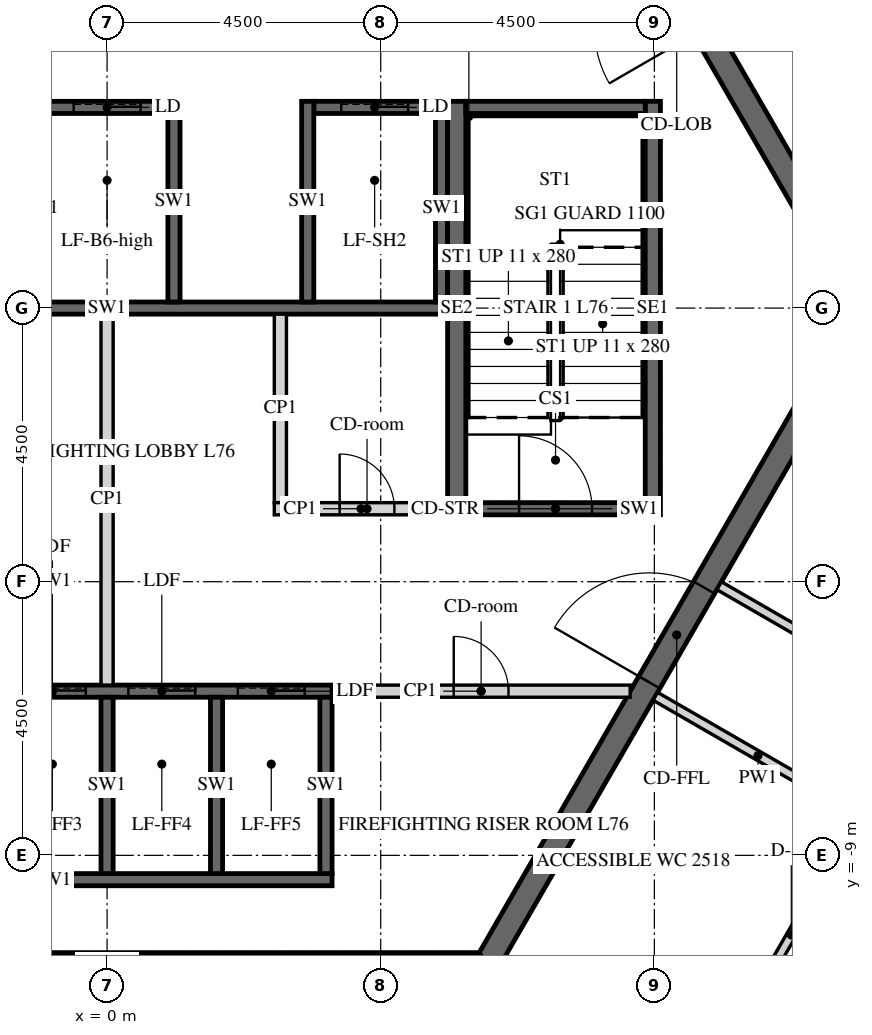
"""IFC4 building model, lengths in metres.
Left out: names, types, materials, properties, quantities, classifications, styles, units other than length and angle.
Written with IfcOpenShell. Run it as: python <this file> out.ifc"""

import sys

from ifc_helpers import new_model, si_unit, direction, frame, frame_2d, origin, place, context, subcontext, project, spatial, polyline, rectangle, outline, extrude, element, fill, save


model = new_model("IFC4")
c1 = context("Model", 3, precision=1e-05, world=origin(), true_north=direction((0.0, 1.0)))
c2 = subcontext(c1, "Body", "Model", "MODEL_VIEW")
j1 = project(units=[si_unit("LENGTHUNIT", "METRE"), si_unit("PLANEANGLEUNIT", "RADIAN")], contexts=[c1])
p1 = place(None, origin())
s1 = spatial("IfcSite", under=j1, at=p1, CompositionType="ELEMENT")
p2 = place(p1, origin())
s2 = spatial("IfcBuilding", under=s1, at=p2, CompositionType="ELEMENT")
p3 = place(p2, frame((0.0, 0.0, 314.7)))
s3 = spatial("IfcBuildingStorey", under=s2, at=p3, CompositionType="ELEMENT", Elevation=314.7)
p4 = place(p3, frame((-6.235, -10.8, -0.15), z_axis=(0.0, 0.0, 1.0), x_axis=(1.0, 0.0, 0.0)))
e1 = element("IfcWall", 1, at=p4, inside=s3, PredefinedType="SHEAR", context=c2, shape_type="SweptSolid", body=[
    extrude(outline(polyline([(-0.115, -0.2), (12.586, -0.2), (12.355, 0.2), (0.115, 0.2), (-0.115, -0.2)])), origin(), (0.0, 0.0, 1.0), 3.9),
])
p5 = place(p3, frame((6.235, -10.8, -0.15), z_axis=(0.0, 0.0, 1.0), x_axis=(0.499996419489, 0.866027470984, 0.0)))
e2 = element("IfcWall", 2, at=p5, inside=s3, PredefinedType="SHEAR", context=c2, shape_type="SweptSolid", body=[
    extrude(outline(polyline([(-0.115, -0.2), (12.586, -0.2), (12.355, 0.2), (0.115, 0.2), (-0.115, -0.2)])), origin(), (0.0, 0.0, 1.0), 3.9),
])
p6 = place(p5, frame((5.364, 0.0, 0.15)))
e3 = element("IfcOpeningElement", 3, at=p6, cuts=e2, PredefinedType="OPENING", context=c2, shape_type="SweptSolid", body=[
    extrude(rectangle(XDim=1.8, YDim=2.4, at=frame_2d((0.9, 1.2))), frame((0.0, 0.21, 0.0), z_axis=(0.0, -1.0, 0.0), x_axis=(1.0, 0.0, 0.0)), (0.0, 0.0, 1.0), 0.42),
])
p7 = place(p3, frame((12.471, 0.0, -0.15), z_axis=(0.0, 0.0, 1.0), x_axis=(-0.499996419489, 0.866027470984, 0.0)))
e4 = element("IfcWall", 4, at=p7, inside=s3, PredefinedType="SHEAR", context=c2, shape_type="SweptSolid", body=[
    extrude(outline(polyline([(-0.115, -0.2), (12.586, -0.2), (12.355, 0.2), (0.115, 0.2), (-0.115, -0.2)])), origin(), (0.0, 0.0, 1.0), 3.9),
])
p8 = place(p7, frame((5.306, 0.0, 0.15)))
e5 = element("IfcOpeningElement", 5, at=p8, cuts=e4, PredefinedType="OPENING", context=c2, shape_type="SweptSolid", body=[
    extrude(rectangle(XDim=1.8, YDim=2.4, at=frame_2d((0.9, 1.2))), frame((0.0, 0.21, 0.0), z_axis=(0.0, -1.0, 0.0), x_axis=(1.0, 0.0, 0.0)), (0.0, 0.0, 1.0), 0.42),
])
p9 = place(p3, frame((-5.6, 3.3, -0.25), z_axis=(0.0, 0.0, 1.0), x_axis=(1.0, 0.0, 0.0)))
e6 = element("IfcWall", 6, at=p9, inside=s3, PredefinedType="SHEAR", context=c2, shape_type="SweptSolid", body=[
    extrude(rectangle(XDim=6.6, YDim=0.2, at=frame_2d((3.3, 0.0))), origin(), (0.0, 0.0, 1.0), 3.9),
])
p10 = place(p9, frame((0.65, 0.0, 0.25)))
e7 = element("IfcOpeningElement", 7, at=p10, cuts=e6, PredefinedType="OPENING", context=c2, shape_type="SweptSolid", body=[
    extrude(rectangle(XDim=1.1, YDim=2.1, at=frame_2d((0.55, 1.05))), frame((0.0, 0.11, 0.0), z_axis=(0.0, -1.0, 0.0), x_axis=(1.0, 0.0, 0.0)), (0.0, 0.0, 1.0), 0.22),
])
p11 = place(p9, frame((2.85, 0.0, 0.25)))
e8 = element("IfcOpeningElement", 8, at=p11, cuts=e6, PredefinedType="OPENING", context=c2, shape_type="SweptSolid", body=[
    extrude(rectangle(XDim=1.1, YDim=2.1, at=frame_2d((0.55, 1.05))), frame((0.0, 0.11, 0.0), z_axis=(0.0, -1.0, 0.0), x_axis=(1.0, 0.0, 0.0)), (0.0, 0.0, 1.0), 0.22),
])
p12 = place(p9, frame((5.05, 0.0, 0.25)))
e9 = element("IfcOpeningElement", 9, at=p12, cuts=e6, PredefinedType="OPENING", context=c2, shape_type="SweptSolid", body=[
    extrude(rectangle(XDim=1.1, YDim=2.1, at=frame_2d((0.55, 1.05))), frame((0.0, 0.11, 0.0), z_axis=(0.0, -1.0, 0.0), x_axis=(1.0, 0.0, 0.0)), (0.0, 0.0, 1.0), 0.22),
])
p13 = place(p3, frame((3.4, 3.3, -0.25), z_axis=(0.0, 0.0, 1.0), x_axis=(1.0, 0.0, 0.0)))
e10 = element("IfcWall", 10, at=p13, inside=s3, PredefinedType="SHEAR", context=c2, shape_type="SweptSolid", body=[
    extrude(rectangle(XDim=2.2, YDim=0.2, at=frame_2d((1.1, 0.0))), origin(), (0.0, 0.0, 1.0), 3.9),
])
p14 = place(p13, frame((0.45, 0.0, 0.25)))
e11 = element("IfcOpeningElement", 11, at=p14, cuts=e10, PredefinedType="OPENING", context=c2, shape_type="SweptSolid", body=[
    extrude(rectangle(XDim=1.1, YDim=2.1, at=frame_2d((0.55, 1.05))), frame((0.0, 0.11, 0.0), z_axis=(0.0, -1.0, 0.0), x_axis=(1.0, 0.0, 0.0)), (0.0, 0.0, 1.0), 0.22),
])
p15 = place(p3, frame((-5.6, 0.0, -0.25), z_axis=(0.0, 0.0, 1.0), x_axis=(1.0, 0.0, 0.0)))
e12 = element("IfcWall", 12, at=p15, inside=s3, PredefinedType="SHEAR", context=c2, shape_type="SweptSolid", body=[
    extrude(rectangle(XDim=11.2, YDim=0.2, at=frame_2d((5.6, 0.0))), origin(), (0.0, 0.0, 1.0), 3.9),
])
for number, where, z_axis, x_axis in (
    (13, (1.1, 0.1, -0.25), (0.0, 0.0, 1.0), (0.0, 1.0, 0.0)),
    (14, (3.3, 0.1, -0.25), (0.0, 0.0, 1.0), (0.0, 1.0, 0.0)),
):
    element("IfcWall", number, at=place(p3, frame(where, z_axis=z_axis, x_axis=x_axis)), inside=s3, PredefinedType="SHEAR", context=c2, shape_type="SweptSolid", body=[
        extrude(rectangle(XDim=3.3, YDim=0.2, at=frame_2d((1.65, 0.0))), origin(), (0.0, 0.0, 1.0), 3.9),
    ])
p16 = place(p3, frame((5.5, 0.1, -0.25), z_axis=(0.0, 0.0, 1.0), x_axis=(0.0, 1.0, 0.0)))
e15 = element("IfcWall", 15, at=p16, inside=s3, PredefinedType="SHEAR", context=c2, shape_type="SweptSolid", body=[
    extrude(rectangle(XDim=3.1, YDim=0.2, at=frame_2d((1.55, 0.0))), origin(), (0.0, 0.0, 1.0), 3.9),
])
p17 = place(p3, frame((-5.5, -6.3, -0.25), z_axis=(0.0, 0.0, 1.0), x_axis=(1.0, 0.0, 0.0)))
e16 = element("IfcWall", 16, at=p17, inside=s3, PredefinedType="SHEAR", context=c2, shape_type="SweptSolid", body=[
    extrude(rectangle(XDim=9.2, YDim=0.2, at=frame_2d((4.6, 0.0))), origin(), (0.0, 0.0, 1.0), 3.9),
])
p18 = place(p17, frame((0.45, 0.0, 0.25)))
e17 = element("IfcOpeningElement", 17, at=p18, cuts=e16, PredefinedType="OPENING", context=c2, shape_type="SweptSolid", body=[
    extrude(rectangle(XDim=1.1, YDim=2.1, at=frame_2d((0.55, 1.05))), frame((0.0, 0.11, 0.0), z_axis=(0.0, -1.0, 0.0), x_axis=(1.0, 0.0, 0.0)), (0.0, 0.0, 1.0), 0.22),
])
p19 = place(p17, frame((2.25, 0.0, 0.25)))
e18 = element("IfcOpeningElement", 18, at=p19, cuts=e16, PredefinedType="OPENING", context=c2, shape_type="SweptSolid", body=[
    extrude(rectangle(XDim=1.1, YDim=2.1, at=frame_2d((0.55, 1.05))), frame((0.0, 0.11, 0.0), z_axis=(0.0, -1.0, 0.0), x_axis=(1.0, 0.0, 0.0)), (0.0, 0.0, 1.0), 0.22),
])
p20 = place(p17, frame((4.05, 0.0, 0.25)))
e19 = element("IfcOpeningElement", 19, at=p20, cuts=e16, PredefinedType="OPENING", context=c2, shape_type="SweptSolid", body=[
    extrude(rectangle(XDim=1.1, YDim=2.1, at=frame_2d((0.55, 1.05))), frame((0.0, 0.11, 0.0), z_axis=(0.0, -1.0, 0.0), x_axis=(1.0, 0.0, 0.0)), (0.0, 0.0, 1.0), 0.22),
])
p21 = place(p17, frame((5.85, 0.0, 0.25)))
e20 = element("IfcOpeningElement", 20, at=p21, cuts=e16, PredefinedType="OPENING", context=c2, shape_type="SweptSolid", body=[
    extrude(rectangle(XDim=1.1, YDim=2.1, at=frame_2d((0.55, 1.05))), frame((0.0, 0.11, 0.0), z_axis=(0.0, -1.0, 0.0), x_axis=(1.0, 0.0, 0.0)), (0.0, 0.0, 1.0), 0.22),
])
p22 = place(p17, frame((7.65, 0.0, 0.25)))
e21 = element("IfcOpeningElement", 21, at=p22, cuts=e16, PredefinedType="OPENING", context=c2, shape_type="SweptSolid", body=[
    extrude(rectangle(XDim=1.1, YDim=2.1, at=frame_2d((0.55, 1.05))), frame((0.0, 0.11, 0.0), z_axis=(0.0, -1.0, 0.0), x_axis=(1.0, 0.0, 0.0)), (0.0, 0.0, 1.0), 0.22),
])
p23 = place(p3, frame((-5.5, -9.4, -0.25), z_axis=(0.0, 0.0, 1.0), x_axis=(1.0, 0.0, 0.0)))
e22 = element("IfcWall", 22, at=p23, inside=s3, PredefinedType="SHEAR", context=c2, shape_type="SweptSolid", body=[
    extrude(rectangle(XDim=9.2, YDim=0.2, at=frame_2d((4.6, 0.0))), origin(), (0.0, 0.0, 1.0), 3.9),
])
for number, where, z_axis, x_axis in (
    (23, (0.0, -9.3, -0.25), (0.0, 0.0, 1.0), (0.0, 1.0, 0.0)),
    (24, (1.8, -9.3, -0.25), (0.0, 0.0, 1.0), (0.0, 1.0, 0.0)),
    (25, (3.6, -9.3, -0.25), (0.0, 0.0, 1.0), (0.0, 1.0, 0.0)),
):
    element("IfcWall", number, at=place(p3, frame(where, z_axis=z_axis, x_axis=x_axis)), inside=s3, PredefinedType="SHEAR", context=c2, shape_type="SweptSolid", body=[
        extrude(rectangle(XDim=2.9, YDim=0.2, at=frame_2d((1.45, 0.0))), origin(), (0.0, 0.0, 1.0), 3.9),
    ])
p24 = place(p3, frame((2.75, -3.3, 0.0), z_axis=(0.0, 0.0, 1.0), x_axis=(1.0, 0.0, 0.0)))
e26 = element("IfcWall", 26, at=p24, inside=s3, PredefinedType="PARTITIONING", context=c2, shape_type="SweptSolid", body=[
    extrude(rectangle(XDim=2.85, YDim=0.2, at=frame_2d((1.425, 0.0))), origin(), (0.0, 0.0, 1.0), 3.65),
])
p25 = place(p24, frame((1.075, 0.0, 0.0)))
e27 = element("IfcOpeningElement", 27, at=p25, cuts=e26, PredefinedType="OPENING", context=c2, shape_type="SweptSolid", body=[
    extrude(rectangle(XDim=0.9, YDim=2.1, at=frame_2d((0.45, 1.05))), frame((0.0, 0.11, 0.0), z_axis=(0.0, -1.0, 0.0), x_axis=(1.0, 0.0, 0.0)), (0.0, 0.0, 1.0), 0.22),
])
p26 = place(p3, frame((2.85, -3.2, 0.0), z_axis=(0.0, 0.0, 1.0), x_axis=(0.0, 1.0, 0.0)))
e28 = element("IfcWall", 28, at=p26, inside=s3, PredefinedType="PARTITIONING", context=c2, shape_type="SweptSolid", body=[
    extrude(rectangle(XDim=3.1, YDim=0.2, at=frame_2d((1.55, 0.0))), origin(), (0.0, 0.0, 1.0), 3.65),
])
p27 = place(p3, frame((0.0, -6.2, 0.0), z_axis=(0.0, 0.0, 1.0), x_axis=(0.0, 1.0, 0.0)))
e29 = element("IfcWall", 29, at=p27, inside=s3, PredefinedType="PARTITIONING", context=c2, shape_type="SweptSolid", body=[
    extrude(rectangle(XDim=6.1, YDim=0.2, at=frame_2d((3.05, 0.0))), origin(), (0.0, 0.0, 1.0), 3.65),
])
p28 = place(p3, frame((3.7, -6.3, 0.0), z_axis=(0.0, 0.0, 1.0), x_axis=(1.0, 0.0, 0.0)))
e30 = element("IfcWall", 30, at=p28, inside=s3, PredefinedType="PARTITIONING", context=c2, shape_type="SweptSolid", body=[
    extrude(rectangle(XDim=4.903, YDim=0.2, at=frame_2d((2.451, 0.0))), origin(), (0.0, 0.0, 1.0), 3.65),
])
p29 = place(p28, frame((2.001, 0.0, 0.0)))
e31 = element("IfcOpeningElement", 31, at=p29, cuts=e30, PredefinedType="OPENING", context=c2, shape_type="SweptSolid", body=[
    extrude(rectangle(XDim=0.9, YDim=2.1, at=frame_2d((0.45, 1.05))), frame((0.0, 0.11, 0.0), z_axis=(0.0, -1.0, 0.0), x_axis=(1.0, 0.0, 0.0)), (0.0, 0.0, 1.0), 0.22),
])
p30 = place(p3, frame((5.75, -3.4, -0.25), z_axis=(0.0, 0.0, 1.0), x_axis=(0.0, 1.0, 0.0)))
e32 = element("IfcWall", 32, at=p30, inside=s3, PredefinedType="SHEAR", context=c2, shape_type="SweptSolid", body=[
    extrude(rectangle(XDim=6.8, YDim=0.3, at=frame_2d((3.4, 0.0))), origin(), (0.0, 0.0, 1.0), 3.9),
])
p31 = place(p3, frame((8.975, -3.4, -0.25), z_axis=(0.0, 0.0, 1.0), x_axis=(0.0, 1.0, 0.0)))
e33 = element("IfcWall", 33, at=p31, inside=s3, PredefinedType="SHEAR", context=c2, shape_type="SweptSolid", body=[
    extrude(rectangle(XDim=6.8, YDim=0.25, at=frame_2d((3.4, 0.0))), origin(), (0.0, 0.0, 1.0), 3.9),
])
p32 = place(p3, frame((5.9, 3.3, -0.25), z_axis=(0.0, 0.0, 1.0), x_axis=(1.0, 0.0, 0.0)))
e34 = element("IfcWall", 34, at=p32, inside=s3, PredefinedType="SHEAR", context=c2, shape_type="SweptSolid", body=[
    extrude(rectangle(XDim=2.95, YDim=0.2, at=frame_2d((1.475, 0.0))), origin(), (0.0, 0.0, 1.0), 3.9),
])
p33 = place(p3, frame((5.9, -3.3, -0.25), z_axis=(0.0, 0.0, 1.0), x_axis=(1.0, 0.0, 0.0)))
e35 = element("IfcWall", 35, at=p33, inside=s3, PredefinedType="SHEAR", context=c2, shape_type="SweptSolid", body=[
    extrude(rectangle(XDim=2.95, YDim=0.2, at=frame_2d((1.475, 0.0))), origin(), (0.0, 0.0, 1.0), 3.9),
])
p34 = place(p33, frame((0.875, 0.0, 0.25)))
e36 = element("IfcOpeningElement", 36, at=p34, cuts=e35, PredefinedType="OPENING", context=c2, shape_type="SweptSolid", body=[
    extrude(rectangle(XDim=1.2, YDim=2.4, at=frame_2d((0.6, 1.2))), frame((0.0, 0.11, 0.0), z_axis=(0.0, -1.0, 0.0), x_axis=(1.0, 0.0, 0.0)), (0.0, 0.0, 1.0), 0.22),
])
p35 = place(p3, frame((11.229, -13.951, 0.0), z_axis=(0.0, 0.0, 1.0), x_axis=(0.499997948852, 0.866026588012, 0.0)))
e37 = element("IfcWall", 37, at=p35, inside=s3, PredefinedType="PARTITIONING", context=c2, shape_type="SweptSolid", body=[
    extrude(rectangle(XDim=14.677, YDim=0.15, at=frame_2d((7.339, 0.0))), origin(), (0.0, 0.0, 1.0), 2.988),
])
p36 = place(p35, frame((1.0, 0.0, 0.0)))
e38 = element("IfcOpeningElement", 38, at=p36, cuts=e37, PredefinedType="OPENING", context=c2, shape_type="SweptSolid", body=[
    extrude(rectangle(XDim=1.0, YDim=2.1, at=frame_2d((0.5, 1.05))), frame((0.0, 0.085, 0.0), z_axis=(0.0, -1.0, 0.0), x_axis=(1.0, 0.0, 0.0)), (0.0, 0.0, 1.0), 0.17),
])
p37 = place(p35, frame((13.527, 0.0, 0.0)))
e39 = element("IfcOpeningElement", 39, at=p37, cuts=e37, PredefinedType="OPENING", context=c2, shape_type="SweptSolid", body=[
    extrude(rectangle(XDim=1.0, YDim=2.1, at=frame_2d((0.5, 1.05))), frame((0.0, 0.085, 0.0), z_axis=(0.0, -1.0, 0.0), x_axis=(1.0, 0.0, 0.0)), (0.0, 0.0, 1.0), 0.17),
])
p38 = place(p3, frame((18.521, -1.171, 0.0), z_axis=(0.0, 0.0, 1.0), x_axis=(-0.559193232449, 0.829037350656, 0.0)))
e40 = element("IfcWall", 40, at=p38, inside=s3, PredefinedType="PARTITIONING", context=c2, shape_type="SweptSolid", body=[
    extrude(rectangle(XDim=16.272, YDim=0.15, at=frame_2d((8.136, 0.0))), origin(), (0.0, 0.0, 1.0), 2.988),
])
p39 = place(p38, frame((3.703, 0.0, 0.0)))
e41 = element("IfcOpeningElement", 41, at=p39, cuts=e40, PredefinedType="OPENING", context=c2, shape_type="SweptSolid", body=[
    extrude(rectangle(XDim=1.0, YDim=2.1, at=frame_2d((0.5, 1.05))), frame((0.0, 0.085, 0.0), z_axis=(0.0, -1.0, 0.0), x_axis=(1.0, 0.0, 0.0)), (0.0, 0.0, 1.0), 0.17),
])
p40 = place(p3, frame((13.378, -6.478, 0.0), z_axis=(0.0, 0.0, 1.0), x_axis=(-0.866011265228, 0.500024487898, 0.0)))
e42 = element("IfcWall", 42, at=p40, inside=s3, PredefinedType="PARTITIONING", context=c2, shape_type="SweptSolid", body=[
    extrude(rectangle(XDim=3.825, YDim=0.15, at=frame_2d((1.913, 0.0))), origin(), (0.0, 0.0, 1.0), 2.988),
])
p41 = place(p3, frame((9.016, -6.384, 0.0), z_axis=(0.0, 0.0, 1.0), x_axis=(0.866042777325, -0.499969906938, 0.0)))
e43 = element("IfcWall", 43, at=p41, inside=s3, PredefinedType="PARTITIONING", context=c2, shape_type="SweptSolid", body=[
    extrude(rectangle(XDim=3.9, YDim=0.15, at=frame_2d((1.95, 0.0))), origin(), (0.0, 0.0, 1.0), 2.988),
])
p42 = place(p3, frame((12.356, -8.399, 0.0), z_axis=(0.0, 0.0, 1.0), x_axis=(-0.499993756358, -0.866029008523, 0.0)))
e44 = element("IfcWall", 44, at=p42, inside=s3, PredefinedType="PARTITIONING", context=c2, shape_type="SweptSolid", body=[
    extrude(rectangle(XDim=4.414, YDim=0.15, at=frame_2d((2.207, 0.0))), origin(), (0.0, 0.0, 1.0), 2.988),
])
p43 = place(p42, frame((1.757, 0.0, 0.0)))
e45 = element("IfcOpeningElement", 45, at=p43, cuts=e44, PredefinedType="OPENING", context=c2, shape_type="SweptSolid", body=[
    extrude(rectangle(XDim=0.9, YDim=2.1, at=frame_2d((0.45, 1.05))), frame((0.0, 0.085, 0.0), z_axis=(0.0, -1.0, 0.0), x_axis=(1.0, 0.0, 0.0)), (0.0, 0.0, 1.0), 0.17),
])
p44 = place(p6, origin())
e46 = element("IfcDoor", 46, at=p44, inside=s3, OperationType="DOUBLE_DOOR_SINGLE_SWING", PredefinedType="DOOR", context=c2, shape_type="SweptSolid", body=[
    extrude(rectangle(XDim=1.8, YDim=2.4, at=frame_2d((0.9, 1.2))), frame((0.0, 0.025, 0.0), z_axis=(0.0, -1.0, 0.0), x_axis=(1.0, 0.0, 0.0)), (0.0, 0.0, 1.0), 0.05),
])
fill(e3, e46)
p45 = place(p25, origin())
e47 = element("IfcDoor", 47, at=p45, inside=s3, OperationType="SINGLE_SWING_LEFT", PredefinedType="DOOR", context=c2, shape_type="SweptSolid", body=[
    extrude(rectangle(XDim=0.9, YDim=2.1, at=frame_2d((0.45, 1.05))), frame((0.0, 0.025, 0.0), z_axis=(0.0, -1.0, 0.0), x_axis=(1.0, 0.0, 0.0)), (0.0, 0.0, 1.0), 0.05),
])
fill(e27, e47)
p46 = place(p29, origin())
e48 = element("IfcDoor", 48, at=p46, inside=s3, OperationType="SINGLE_SWING_LEFT", PredefinedType="DOOR", context=c2, shape_type="SweptSolid", body=[
    extrude(rectangle(XDim=0.9, YDim=2.1, at=frame_2d((0.45, 1.05))), frame((0.0, 0.025, 0.0), z_axis=(0.0, -1.0, 0.0), x_axis=(1.0, 0.0, 0.0)), (0.0, 0.0, 1.0), 0.05),
])
fill(e31, e48)
p47 = place(p34, origin())
e49 = element("IfcDoor", 49, at=p47, inside=s3, OperationType="SINGLE_SWING_LEFT", PredefinedType="DOOR", context=c2, shape_type="SweptSolid", body=[
    extrude(rectangle(XDim=1.2, YDim=2.4, at=frame_2d((0.6, 1.2))), frame((0.0, 0.025, 0.0), z_axis=(0.0, -1.0, 0.0), x_axis=(1.0, 0.0, 0.0)), (0.0, 0.0, 1.0), 0.05),
])
fill(e36, e49)
p48 = place(p12, origin())
e50 = element("IfcDoor", 50, at=p48, inside=s3, OperationType="SLIDING_TO_LEFT", PredefinedType="DOOR", context=c2, shape_type="SweptSolid", body=[
    extrude(rectangle(XDim=1.1, YDim=2.1, at=frame_2d((0.55, 1.05))), frame((0.0, 0.025, 0.0), z_axis=(0.0, -1.0, 0.0), x_axis=(1.0, 0.0, 0.0)), (0.0, 0.0, 1.0), 0.05),
])
fill(e9, e50)
p49 = place(p14, origin())
e51 = element("IfcDoor", 51, at=p49, inside=s3, OperationType="SLIDING_TO_LEFT", PredefinedType="DOOR", context=c2, shape_type="SweptSolid", body=[
    extrude(rectangle(XDim=1.1, YDim=2.1, at=frame_2d((0.55, 1.05))), frame((0.0, 0.025, 0.0), z_axis=(0.0, -1.0, 0.0), x_axis=(1.0, 0.0, 0.0)), (0.0, 0.0, 1.0), 0.05),
])
fill(e11, e51)
p50 = place(p20, origin())
e52 = element("IfcDoor", 52, at=p50, inside=s3, OperationType="SLIDING_TO_LEFT", PredefinedType="DOOR", context=c2, shape_type="SweptSolid", body=[
    extrude(rectangle(XDim=1.1, YDim=2.1, at=frame_2d((0.55, 1.05))), frame((0.0, 0.025, 0.0), z_axis=(0.0, -1.0, 0.0), x_axis=(1.0, 0.0, 0.0)), (0.0, 0.0, 1.0), 0.05),
])
fill(e19, e52)
p51 = place(p21, origin())
e53 = element("IfcDoor", 53, at=p51, inside=s3, OperationType="SLIDING_TO_LEFT", PredefinedType="DOOR", context=c2, shape_type="SweptSolid", body=[
    extrude(rectangle(XDim=1.1, YDim=2.1, at=frame_2d((0.55, 1.05))), frame((0.0, 0.025, 0.0), z_axis=(0.0, -1.0, 0.0), x_axis=(1.0, 0.0, 0.0)), (0.0, 0.0, 1.0), 0.05),
])
fill(e20, e53)
p52 = place(p22, origin())
e54 = element("IfcDoor", 54, at=p52, inside=s3, OperationType="SLIDING_TO_LEFT", PredefinedType="DOOR", context=c2, shape_type="SweptSolid", body=[
    extrude(rectangle(XDim=1.1, YDim=2.1, at=frame_2d((0.55, 1.05))), frame((0.0, 0.025, 0.0), z_axis=(0.0, -1.0, 0.0), x_axis=(1.0, 0.0, 0.0)), (0.0, 0.0, 1.0), 0.05),
])
fill(e21, e54)
p53 = place(p43, origin())
e55 = element("IfcDoor", 55, at=p53, inside=s3, OperationType="SINGLE_SWING_LEFT", PredefinedType="DOOR", context=c2, shape_type="SweptSolid", body=[
    extrude(rectangle(XDim=0.9, YDim=2.1, at=frame_2d((0.45, 1.05))), frame((0.0, 0.025, 0.0), z_axis=(0.0, -1.0, 0.0), x_axis=(1.0, 0.0, 0.0)), (0.0, 0.0, 1.0), 0.05),
])
fill(e45, e55)
save(model, sys.argv[1])
